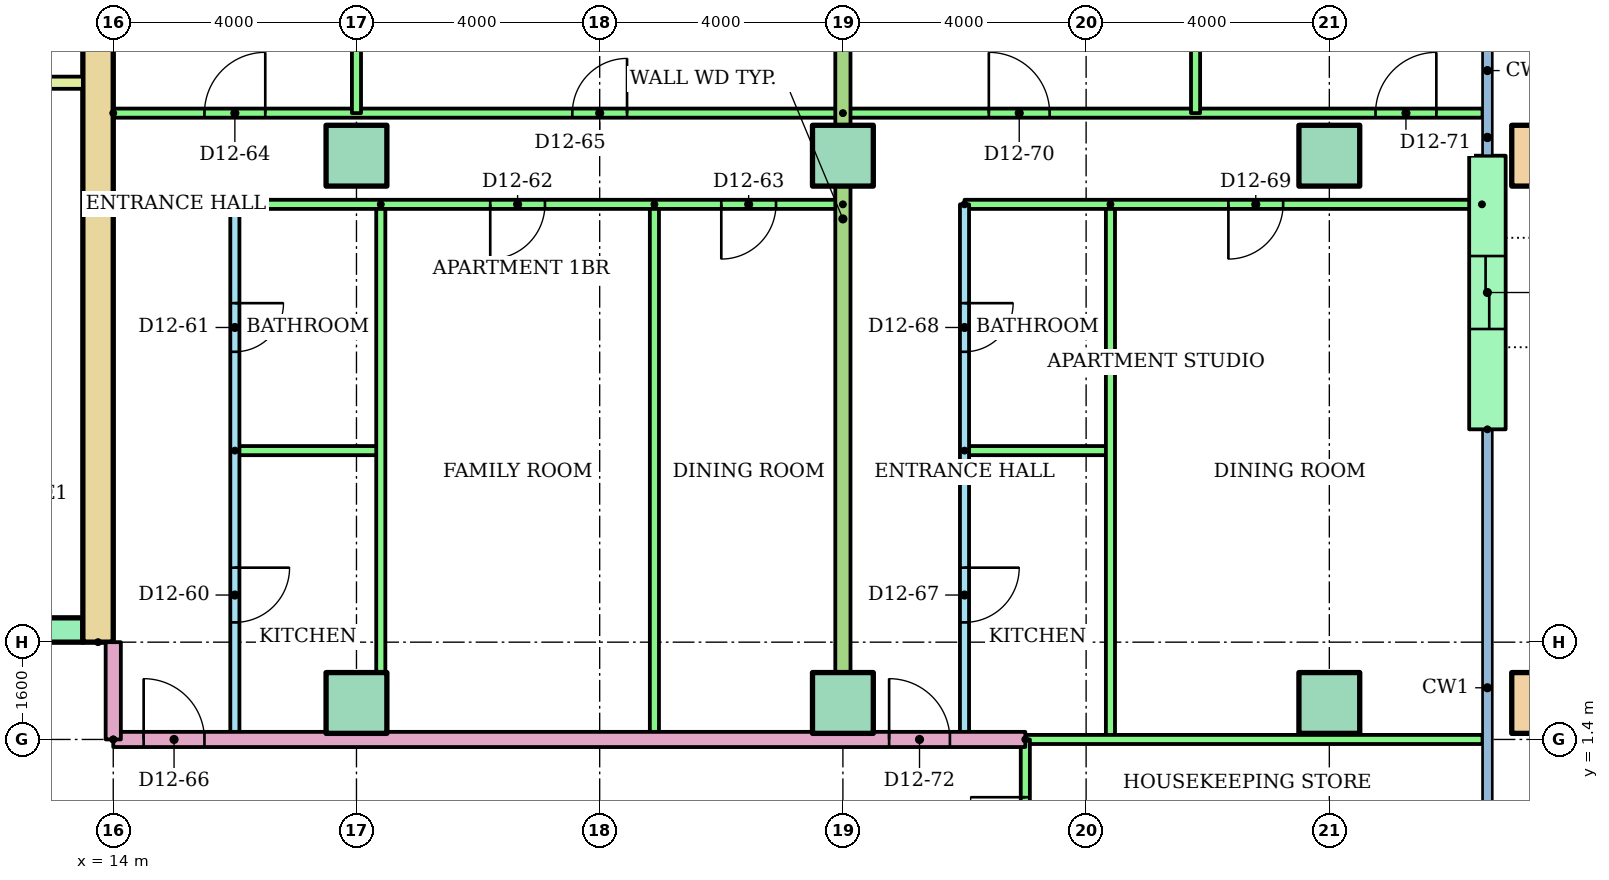
"""IFC4 building model, lengths in metres.
Left out: names, types, materials, properties, quantities, classifications, styles, units other than length and angle.
Written with IfcOpenShell. Run it as: python <this file> out.ifc"""

import sys

from ifc_helpers import new_model, si_unit, direction, frame, frame_2d, origin, origin_2d, place, context, subcontext, project, spatial, rectangle, hollow_rectangle, extrude, element, fill, save


model = new_model("IFC4")
c1 = context("Model", 3, precision=1e-05, world=origin(), true_north=direction((0.0, 1.0)))
c2 = subcontext(c1, "Body", "Model", "MODEL_VIEW")
j1 = project(units=[si_unit("LENGTHUNIT", "METRE"), si_unit("PLANEANGLEUNIT", "RADIAN")], contexts=[c1])
p1 = place(None, origin())
s1 = spatial("IfcSite", under=j1, at=p1, CompositionType="ELEMENT")
p2 = place(p1, origin())
s2 = spatial("IfcBuilding", under=s1, at=p2, CompositionType="ELEMENT")
p3 = place(p2, frame((0.0, 0.0, 48.0)))
s3 = spatial("IfcBuildingStorey", under=s2, at=p3, CompositionType="ELEMENT", Elevation=48.0)
for number, where in (
    (1, (18.0, 2.0, 0.0)),
    (2, (26.0, 2.0, 0.0)),
    (3, (34.0, 2.0, 0.0)),
):
    element("IfcColumn", number, at=place(p3, frame(where)), inside=s3, PredefinedType="COLUMN", context=c2, shape_type="SweptSolid", body=[
        extrude(rectangle(XDim=1.0, YDim=1.0, at=origin_2d()), origin(), (0.0, 0.0, 1.0), 3.2),
    ])
p4 = place(p3, frame((37.5, 2.0, 0.0)))
e4 = element("IfcColumn", 4, at=p4, inside=s3, PredefinedType="COLUMN", context=c2, shape_type="SweptSolid", body=[
    extrude(hollow_rectangle(XDim=1.0, YDim=1.0, WallThickness=0.05, at=origin_2d()), origin(), (0.0, 0.0, 1.0), 3.2),
])
for number, where in (
    (5, (18.0, 11.0, 0.0)),
    (6, (26.0, 11.0, 0.0)),
    (7, (34.0, 11.0, 0.0)),
):
    element("IfcColumn", number, at=place(p3, frame(where)), inside=s3, PredefinedType="COLUMN", context=c2, shape_type="SweptSolid", body=[
        extrude(rectangle(XDim=1.0, YDim=1.0, at=origin_2d()), origin(), (0.0, 0.0, 1.0), 3.2),
    ])
p5 = place(p3, frame((37.5, 11.0, 0.0)))
e8 = element("IfcColumn", 8, at=p5, inside=s3, PredefinedType="COLUMN", context=c2, shape_type="SweptSolid", body=[
    extrude(hollow_rectangle(XDim=1.0, YDim=1.0, WallThickness=0.05, at=origin_2d()), origin(), (0.0, 0.0, 1.0), 3.2),
])
p6 = place(p3, frame((36.6, 6.5, 0.0), z_axis=(0.0, 0.0, 1.0), x_axis=(0.0, 1.0, 0.0)))
e9 = element("IfcWall", 9, at=p6, inside=s3, PredefinedType="STANDARD", context=c2, shape_type="SweptSolid", body=[
    extrude(rectangle(XDim=4.5, YDim=0.6, at=frame_2d((2.25, 0.0))), origin(), (0.0, 0.0, 1.0), 2.92),
])
p7 = place(p6, frame((1.65, 0.0, 0.0)))
e10 = element("IfcOpeningElement", 10, at=p7, cuts=e9, PredefinedType="OPENING", context=c2, shape_type="SweptSolid", body=[
    extrude(rectangle(XDim=1.2, YDim=2.1, at=frame_2d((0.6, 1.05))), frame((0.0, 0.31, 0.0), z_axis=(0.0, -1.0, 0.0), x_axis=(1.0, 0.0, 0.0)), (0.0, 0.0, 1.0), 0.62),
])
p8 = place(p3, frame((13.75, 3.0, 0.0), z_axis=(0.0, 0.0, 1.0), x_axis=(0.0, 1.0, 0.0)))
e11 = element("IfcWall", 11, at=p8, inside=s3, PredefinedType="SHEAR", context=c2, shape_type="SweptSolid", body=[
    extrude(rectangle(XDim=17.0, YDim=0.5, at=frame_2d((8.5, 0.0))), origin(), (0.0, 0.0, 1.0), 2.92),
])
p9 = place(p3, frame((-13.5, 3.2, 0.0)))
e12 = element("IfcWall", 12, at=p9, inside=s3, PredefinedType="SHEAR", context=c2, shape_type="SweptSolid", body=[
    extrude(rectangle(XDim=27.0, YDim=0.4, at=frame_2d((13.5, 0.0))), origin(), (0.0, 0.0, 1.0), 2.92),
])
p10 = place(p9, frame((6.861, 0.0, 0.0)))
e13 = element("IfcOpeningElement", 13, at=p10, cuts=e12, PredefinedType="OPENING", context=c2, shape_type="SweptSolid", body=[
    extrude(rectangle(XDim=1.1, YDim=2.1, at=frame_2d((0.55, 1.05))), frame((0.0, 0.21, 0.0), z_axis=(0.0, -1.0, 0.0), x_axis=(1.0, 0.0, 0.0)), (0.0, 0.0, 1.0), 0.42),
])
p11 = place(p9, frame((9.906, 0.0, 0.0)))
e14 = element("IfcOpeningElement", 14, at=p11, cuts=e12, PredefinedType="OPENING", context=c2, shape_type="SweptSolid", body=[
    extrude(rectangle(XDim=1.1, YDim=2.1, at=frame_2d((0.55, 1.05))), frame((0.0, 0.21, 0.0), z_axis=(0.0, -1.0, 0.0), x_axis=(1.0, 0.0, 0.0)), (0.0, 0.0, 1.0), 0.42),
])
p12 = place(p9, frame((15.994, 0.0, 0.0)))
e15 = element("IfcOpeningElement", 15, at=p12, cuts=e12, PredefinedType="OPENING", context=c2, shape_type="SweptSolid", body=[
    extrude(rectangle(XDim=1.1, YDim=2.1, at=frame_2d((0.55, 1.05))), frame((0.0, 0.21, 0.0), z_axis=(0.0, -1.0, 0.0), x_axis=(1.0, 0.0, 0.0)), (0.0, 0.0, 1.0), 0.42),
])
p13 = place(p9, frame((19.039, 0.0, 0.0)))
e16 = element("IfcOpeningElement", 16, at=p13, cuts=e12, PredefinedType="OPENING", context=c2, shape_type="SweptSolid", body=[
    extrude(rectangle(XDim=1.1, YDim=2.1, at=frame_2d((0.55, 1.05))), frame((0.0, 0.21, 0.0), z_axis=(0.0, -1.0, 0.0), x_axis=(1.0, 0.0, 0.0)), (0.0, 0.0, 1.0), 0.42),
])
p14 = place(p9, frame((12.6, 0.0, 0.0)))
e17 = element("IfcOpeningElement", 17, at=p14, cuts=e12, PredefinedType="OPENING", context=c2, shape_type="SweptSolid", body=[
    extrude(rectangle(XDim=1.8, YDim=2.1, at=frame_2d((0.9, 1.05))), frame((0.0, 0.21, 0.0), z_axis=(0.0, -1.0, 0.0), x_axis=(1.0, 0.0, 0.0)), (0.0, 0.0, 1.0), 0.42),
])
p15 = place(p3, frame((9.6, 12.2, 0.0)))
e18 = element("IfcWall", 18, at=p15, inside=s3, PredefinedType="PARTITIONING", context=c2, shape_type="SweptSolid", body=[
    extrude(rectangle(XDim=3.9, YDim=0.2, at=frame_2d((1.95, 0.0))), origin(), (0.0, 0.0, 1.0), 2.92),
])
p16 = place(p3, frame((16.0, 10.2, 0.0), z_axis=(0.0, 0.0, 1.0), x_axis=(0.0, -1.0, 0.0)))
e19 = element("IfcWall", 19, at=p16, inside=s3, PredefinedType="PARTITIONING", context=c2, shape_type="SweptSolid", body=[
    extrude(rectangle(XDim=8.8, YDim=0.15, at=frame_2d((4.4, 0.0))), origin(), (0.0, 0.0, 1.0), 2.4),
])
p17 = place(p16, frame((5.975, 0.0, 0.0)))
e20 = element("IfcOpeningElement", 20, at=p17, cuts=e19, PredefinedType="OPENING", context=c2, shape_type="SweptSolid", body=[
    extrude(rectangle(XDim=0.9, YDim=2.1, at=frame_2d((0.45, 1.05))), frame((0.0, 0.085, 0.0), z_axis=(0.0, -1.0, 0.0), x_axis=(1.0, 0.0, 0.0)), (0.0, 0.0, 1.0), 0.17),
])
p18 = place(p16, frame((1.625, 0.0, 0.0)))
e21 = element("IfcOpeningElement", 21, at=p18, cuts=e19, PredefinedType="OPENING", context=c2, shape_type="SweptSolid", body=[
    extrude(rectangle(XDim=0.8, YDim=2.1, at=frame_2d((0.4, 1.05))), frame((0.0, 0.085, 0.0), z_axis=(0.0, -1.0, 0.0), x_axis=(1.0, 0.0, 0.0)), (0.0, 0.0, 1.0), 0.17),
])
p19 = place(p3, frame((16.0, 6.15, 0.0)))
e22 = element("IfcWall", 22, at=p19, inside=s3, PredefinedType="PARTITIONING", context=c2, shape_type="SweptSolid", body=[
    extrude(rectangle(XDim=2.4, YDim=0.15, at=frame_2d((1.2, 0.0))), origin(), (0.0, 0.0, 1.0), 2.4),
])
for number, where, z_axis, x_axis in (
    (23, (18.4, 10.2, 0.0), (0.0, 0.0, 1.0), (0.0, -1.0, 0.0)),
    (24, (22.9, 10.2, 0.0), (0.0, 0.0, 1.0), (0.0, -1.0, 0.0)),
):
    element("IfcWall", number, at=place(p3, frame(where, z_axis=z_axis, x_axis=x_axis)), inside=s3, PredefinedType="PARTITIONING", context=c2, shape_type="SweptSolid", body=[
        extrude(rectangle(XDim=8.8, YDim=0.15, at=frame_2d((4.4, 0.0))), origin(), (0.0, 0.0, 1.0), 2.4),
    ])
p20 = place(p3, frame((26.0, 10.2, 0.0), z_axis=(0.0, 0.0, 1.0), x_axis=(-1.0, 0.0, 0.0)))
e25 = element("IfcWall", 25, at=p20, inside=s3, PredefinedType="PARTITIONING", context=c2, shape_type="SweptSolid", body=[
    extrude(rectangle(XDim=10.0, YDim=0.15, at=frame_2d((5.0, 0.0))), origin(), (0.0, 0.0, 1.0), 2.4),
])
p21 = place(p20, frame((4.9, 0.0, 0.0)))
e26 = element("IfcOpeningElement", 26, at=p21, cuts=e25, PredefinedType="OPENING", context=c2, shape_type="SweptSolid", body=[
    extrude(rectangle(XDim=0.9, YDim=2.1, at=frame_2d((0.45, 1.05))), frame((0.0, 0.085, 0.0), z_axis=(0.0, -1.0, 0.0), x_axis=(1.0, 0.0, 0.0)), (0.0, 0.0, 1.0), 0.17),
])
p22 = place(p20, frame((1.1, 0.0, 0.0)))
e27 = element("IfcOpeningElement", 27, at=p22, cuts=e25, PredefinedType="OPENING", context=c2, shape_type="SweptSolid", body=[
    extrude(rectangle(XDim=0.9, YDim=2.1, at=frame_2d((0.45, 1.05))), frame((0.0, 0.085, 0.0), z_axis=(0.0, -1.0, 0.0), x_axis=(1.0, 0.0, 0.0)), (0.0, 0.0, 1.0), 0.17),
])
p23 = place(p3, frame((14.0, 11.7, 0.0)))
e28 = element("IfcWall", 28, at=p23, inside=s3, PredefinedType="PARTITIONING", context=c2, shape_type="SweptSolid", body=[
    extrude(rectangle(XDim=12.0, YDim=0.15, at=frame_2d((6.0, 0.0))), origin(), (0.0, 0.0, 1.0), 2.4),
])
p24 = place(p23, frame((1.5, 0.0, 0.0)))
e29 = element("IfcOpeningElement", 29, at=p24, cuts=e28, PredefinedType="OPENING", context=c2, shape_type="SweptSolid", body=[
    extrude(rectangle(XDim=1.0, YDim=2.1, at=frame_2d((0.5, 1.05))), frame((0.0, 0.085, 0.0), z_axis=(0.0, -1.0, 0.0), x_axis=(1.0, 0.0, 0.0)), (0.0, 0.0, 1.0), 0.17),
])
p25 = place(p23, frame((7.55, 0.0, 0.0)))
e30 = element("IfcOpeningElement", 30, at=p25, cuts=e28, PredefinedType="OPENING", context=c2, shape_type="SweptSolid", body=[
    extrude(rectangle(XDim=0.9, YDim=2.1, at=frame_2d((0.45, 1.05))), frame((0.0, 0.085, 0.0), z_axis=(0.0, -1.0, 0.0), x_axis=(1.0, 0.0, 0.0)), (0.0, 0.0, 1.0), 0.17),
])
p26 = place(p3, frame((18.0, 18.521, 0.0), z_axis=(0.0, 0.0, 1.0), x_axis=(0.0, -1.0, 0.0)))
e31 = element("IfcWall", 31, at=p26, inside=s3, PredefinedType="PARTITIONING", context=c2, shape_type="SweptSolid", body=[
    extrude(rectangle(XDim=6.821, YDim=0.15, at=frame_2d((3.411, 0.0))), origin(), (0.0, 0.0, 1.0), 2.4),
])
p27 = place(p3, frame((28.0, 10.2, 0.0), z_axis=(0.0, 0.0, 1.0), x_axis=(0.0, -1.0, 0.0)))
e32 = element("IfcWall", 32, at=p27, inside=s3, PredefinedType="PARTITIONING", context=c2, shape_type="SweptSolid", body=[
    extrude(rectangle(XDim=8.8, YDim=0.15, at=frame_2d((4.4, 0.0))), origin(), (0.0, 0.0, 1.0), 2.4),
])
p28 = place(p27, frame((5.975, 0.0, 0.0)))
e33 = element("IfcOpeningElement", 33, at=p28, cuts=e32, PredefinedType="OPENING", context=c2, shape_type="SweptSolid", body=[
    extrude(rectangle(XDim=0.9, YDim=2.1, at=frame_2d((0.45, 1.05))), frame((0.0, 0.085, 0.0), z_axis=(0.0, -1.0, 0.0), x_axis=(1.0, 0.0, 0.0)), (0.0, 0.0, 1.0), 0.17),
])
p29 = place(p27, frame((1.625, 0.0, 0.0)))
e34 = element("IfcOpeningElement", 34, at=p29, cuts=e32, PredefinedType="OPENING", context=c2, shape_type="SweptSolid", body=[
    extrude(rectangle(XDim=0.8, YDim=2.1, at=frame_2d((0.4, 1.05))), frame((0.0, 0.085, 0.0), z_axis=(0.0, -1.0, 0.0), x_axis=(1.0, 0.0, 0.0)), (0.0, 0.0, 1.0), 0.17),
])
p30 = place(p3, frame((28.0, 6.15, 0.0)))
e35 = element("IfcWall", 35, at=p30, inside=s3, PredefinedType="PARTITIONING", context=c2, shape_type="SweptSolid", body=[
    extrude(rectangle(XDim=2.4, YDim=0.15, at=frame_2d((1.2, 0.0))), origin(), (0.0, 0.0, 1.0), 2.4),
])
p31 = place(p3, frame((30.4, 10.2, 0.0), z_axis=(0.0, 0.0, 1.0), x_axis=(0.0, -1.0, 0.0)))
e36 = element("IfcWall", 36, at=p31, inside=s3, PredefinedType="PARTITIONING", context=c2, shape_type="SweptSolid", body=[
    extrude(rectangle(XDim=8.8, YDim=0.15, at=frame_2d((4.4, 0.0))), origin(), (0.0, 0.0, 1.0), 2.4),
])
p32 = place(p3, frame((36.51, 10.2, 0.0), z_axis=(0.0, 0.0, 1.0), x_axis=(-1.0, 0.0, 0.0)))
e37 = element("IfcWall", 37, at=p32, inside=s3, PredefinedType="PARTITIONING", context=c2, shape_type="SweptSolid", body=[
    extrude(rectangle(XDim=8.51, YDim=0.15, at=frame_2d((4.255, 0.0))), origin(), (0.0, 0.0, 1.0), 2.4),
])
p33 = place(p32, frame((3.27, 0.0, 0.0)))
e38 = element("IfcOpeningElement", 38, at=p33, cuts=e37, PredefinedType="OPENING", context=c2, shape_type="SweptSolid", body=[
    extrude(rectangle(XDim=0.9, YDim=2.1, at=frame_2d((0.45, 1.05))), frame((0.0, 0.085, 0.0), z_axis=(0.0, -1.0, 0.0), x_axis=(1.0, 0.0, 0.0)), (0.0, 0.0, 1.0), 0.17),
])
p34 = place(p3, frame((26.0, 11.7, 0.0)))
e39 = element("IfcWall", 39, at=p34, inside=s3, PredefinedType="PARTITIONING", context=c2, shape_type="SweptSolid", body=[
    extrude(rectangle(XDim=10.52, YDim=0.15, at=frame_2d((5.26, 0.0))), origin(), (0.0, 0.0, 1.0), 2.4),
])
p35 = place(p34, frame((2.4, 0.0, 0.0)))
e40 = element("IfcOpeningElement", 40, at=p35, cuts=e39, PredefinedType="OPENING", context=c2, shape_type="SweptSolid", body=[
    extrude(rectangle(XDim=1.0, YDim=2.1, at=frame_2d((0.5, 1.05))), frame((0.0, 0.085, 0.0), z_axis=(0.0, -1.0, 0.0), x_axis=(1.0, 0.0, 0.0)), (0.0, 0.0, 1.0), 0.17),
])
p36 = place(p34, frame((8.76, 0.0, 0.0)))
e41 = element("IfcOpeningElement", 41, at=p36, cuts=e39, PredefinedType="OPENING", context=c2, shape_type="SweptSolid", body=[
    extrude(rectangle(XDim=1.0, YDim=2.1, at=frame_2d((0.5, 1.05))), frame((0.0, 0.085, 0.0), z_axis=(0.0, -1.0, 0.0), x_axis=(1.0, 0.0, 0.0)), (0.0, 0.0, 1.0), 0.17),
])
p37 = place(p3, frame((31.8, 16.72, 0.0), z_axis=(0.0, 0.0, 1.0), x_axis=(0.0, -1.0, 0.0)))
e42 = element("IfcWall", 42, at=p37, inside=s3, PredefinedType="PARTITIONING", context=c2, shape_type="SweptSolid", body=[
    extrude(rectangle(XDim=5.02, YDim=0.15, at=frame_2d((2.51, 0.0))), origin(), (0.0, 0.0, 1.0), 2.4),
])
p38 = place(p3, frame((26.0, 18.521, 0.0), z_axis=(0.0, 0.0, 1.0), x_axis=(0.0, -1.0, 0.0)))
e43 = element("IfcWall", 43, at=p38, inside=s3, PredefinedType="PARTITIONING", context=c2, shape_type="SweptSolid", body=[
    extrude(rectangle(XDim=17.121, YDim=0.25, at=frame_2d((8.561, 0.0))), origin(), (0.0, 0.0, 1.0), 2.4),
])
p39 = place(p3, frame((14.0, 1.4, 0.0)))
e44 = element("IfcWall", 44, at=p39, inside=s3, PredefinedType="PARTITIONING", context=c2, shape_type="SweptSolid", body=[
    extrude(rectangle(XDim=15.0, YDim=0.25, at=frame_2d((7.5, 0.0))), origin(), (0.0, 0.0, 1.0), 2.4),
])
p40 = place(p39, frame((0.5, 0.0, 0.0)))
e45 = element("IfcOpeningElement", 45, at=p40, cuts=e44, PredefinedType="OPENING", context=c2, shape_type="SweptSolid", body=[
    extrude(rectangle(XDim=1.0, YDim=2.1, at=frame_2d((0.5, 1.05))), frame((0.0, 0.135, 0.0), z_axis=(0.0, -1.0, 0.0), x_axis=(1.0, 0.0, 0.0)), (0.0, 0.0, 1.0), 0.27),
])
p41 = place(p39, frame((12.76, 0.0, 0.0)))
e46 = element("IfcOpeningElement", 46, at=p41, cuts=e44, PredefinedType="OPENING", context=c2, shape_type="SweptSolid", body=[
    extrude(rectangle(XDim=1.0, YDim=2.1, at=frame_2d((0.5, 1.05))), frame((0.0, 0.135, 0.0), z_axis=(0.0, -1.0, 0.0), x_axis=(1.0, 0.0, 0.0)), (0.0, 0.0, 1.0), 0.27),
])
p42 = place(p3, frame((29.0, 1.4, 0.0)))
e47 = element("IfcWall", 47, at=p42, inside=s3, PredefinedType="PARTITIONING", context=c2, shape_type="SweptSolid", body=[
    extrude(rectangle(XDim=7.52, YDim=0.15, at=frame_2d((3.76, 0.0))), origin(), (0.0, 0.0, 1.0), 2.4),
])
p43 = place(p3, frame((29.0, -1.4, 0.0), z_axis=(0.0, 0.0, 1.0), x_axis=(0.0, 1.0, 0.0)))
e48 = element("IfcWall", 48, at=p43, inside=s3, PredefinedType="PARTITIONING", context=c2, shape_type="SweptSolid", body=[
    extrude(rectangle(XDim=2.8, YDim=0.15, at=frame_2d((1.4, 0.0))), origin(), (0.0, 0.0, 1.0), 2.4),
])
p44 = place(p43, frame((0.95, 0.0, 0.0)))
e49 = element("IfcOpeningElement", 49, at=p44, cuts=e48, PredefinedType="OPENING", context=c2, shape_type="SweptSolid", body=[
    extrude(rectangle(XDim=0.9, YDim=2.1, at=frame_2d((0.45, 1.05))), frame((0.0, 0.085, 0.0), z_axis=(0.0, -1.0, 0.0), x_axis=(1.0, 0.0, 0.0)), (0.0, 0.0, 1.0), 0.17),
])
p45 = place(p3, frame((14.0, 1.4, 0.0), z_axis=(0.0, 0.0, 1.0), x_axis=(0.0, 1.0, 0.0)))
e50 = element("IfcWall", 50, at=p45, inside=s3, PredefinedType="PARTITIONING", context=c2, shape_type="SweptSolid", body=[
    extrude(rectangle(XDim=1.6, YDim=0.25, at=frame_2d((0.8, 0.0))), origin(), (0.0, 0.0, 1.0), 2.4),
])
p46 = place(p17, origin())
e51 = element("IfcDoor", 51, at=p46, inside=s3, OperationType="SINGLE_SWING_LEFT", PredefinedType="DOOR", context=c2, shape_type="SweptSolid", body=[
    extrude(rectangle(XDim=0.9, YDim=2.1, at=frame_2d((0.45, 1.05))), frame((0.0, 0.025, 0.0), z_axis=(0.0, -1.0, 0.0), x_axis=(1.0, 0.0, 0.0)), (0.0, 0.0, 1.0), 0.05),
])
fill(e20, e51)
p47 = place(p18, origin())
e52 = element("IfcDoor", 52, at=p47, inside=s3, OperationType="SINGLE_SWING_LEFT", PredefinedType="DOOR", context=c2, shape_type="SweptSolid", body=[
    extrude(rectangle(XDim=0.8, YDim=2.1, at=frame_2d((0.4, 1.05))), frame((0.0, 0.025, 0.0), z_axis=(0.0, -1.0, 0.0), x_axis=(1.0, 0.0, 0.0)), (0.0, 0.0, 1.0), 0.05),
])
fill(e21, e52)
p48 = place(p21, origin())
e53 = element("IfcDoor", 53, at=p48, inside=s3, OperationType="SINGLE_SWING_RIGHT", PredefinedType="DOOR", context=c2, shape_type="SweptSolid", body=[
    extrude(rectangle(XDim=0.9, YDim=2.1, at=frame_2d((0.45, 1.05))), frame((0.0, 0.025, 0.0), z_axis=(0.0, -1.0, 0.0), x_axis=(1.0, 0.0, 0.0)), (0.0, 0.0, 1.0), 0.05),
])
fill(e26, e53)
p49 = place(p22, origin())
e54 = element("IfcDoor", 54, at=p49, inside=s3, OperationType="SINGLE_SWING_RIGHT", PredefinedType="DOOR", context=c2, shape_type="SweptSolid", body=[
    extrude(rectangle(XDim=0.9, YDim=2.1, at=frame_2d((0.45, 1.05))), frame((0.0, 0.025, 0.0), z_axis=(0.0, -1.0, 0.0), x_axis=(1.0, 0.0, 0.0)), (0.0, 0.0, 1.0), 0.05),
])
fill(e27, e54)
p50 = place(p24, origin())
e55 = element("IfcDoor", 55, at=p50, inside=s3, OperationType="SINGLE_SWING_RIGHT", PredefinedType="DOOR", context=c2, shape_type="SweptSolid", body=[
    extrude(rectangle(XDim=1.0, YDim=2.1, at=frame_2d((0.5, 1.05))), frame((0.0, 0.025, 0.0), z_axis=(0.0, -1.0, 0.0), x_axis=(1.0, 0.0, 0.0)), (0.0, 0.0, 1.0), 0.05),
])
fill(e29, e55)
p51 = place(p25, origin())
e56 = element("IfcDoor", 56, at=p51, inside=s3, OperationType="SINGLE_SWING_RIGHT", PredefinedType="DOOR", context=c2, shape_type="SweptSolid", body=[
    extrude(rectangle(XDim=0.9, YDim=2.1, at=frame_2d((0.45, 1.05))), frame((0.0, 0.025, 0.0), z_axis=(0.0, -1.0, 0.0), x_axis=(1.0, 0.0, 0.0)), (0.0, 0.0, 1.0), 0.05),
])
fill(e30, e56)
p52 = place(p40, origin())
e57 = element("IfcDoor", 57, at=p52, inside=s3, OperationType="SINGLE_SWING_LEFT", PredefinedType="DOOR", context=c2, shape_type="SweptSolid", body=[
    extrude(rectangle(XDim=1.0, YDim=2.1, at=frame_2d((0.5, 1.05))), frame((0.0, 0.025, 0.0), z_axis=(0.0, -1.0, 0.0), x_axis=(1.0, 0.0, 0.0)), (0.0, 0.0, 1.0), 0.05),
])
fill(e45, e57)
p53 = place(p28, origin())
e58 = element("IfcDoor", 58, at=p53, inside=s3, OperationType="SINGLE_SWING_LEFT", PredefinedType="DOOR", context=c2, shape_type="SweptSolid", body=[
    extrude(rectangle(XDim=0.9, YDim=2.1, at=frame_2d((0.45, 1.05))), frame((0.0, 0.025, 0.0), z_axis=(0.0, -1.0, 0.0), x_axis=(1.0, 0.0, 0.0)), (0.0, 0.0, 1.0), 0.05),
])
fill(e33, e58)
p54 = place(p29, origin())
e59 = element("IfcDoor", 59, at=p54, inside=s3, OperationType="SINGLE_SWING_LEFT", PredefinedType="DOOR", context=c2, shape_type="SweptSolid", body=[
    extrude(rectangle(XDim=0.8, YDim=2.1, at=frame_2d((0.4, 1.05))), frame((0.0, 0.025, 0.0), z_axis=(0.0, -1.0, 0.0), x_axis=(1.0, 0.0, 0.0)), (0.0, 0.0, 1.0), 0.05),
])
fill(e34, e59)
p55 = place(p33, origin())
e60 = element("IfcDoor", 60, at=p55, inside=s3, OperationType="SINGLE_SWING_RIGHT", PredefinedType="DOOR", context=c2, shape_type="SweptSolid", body=[
    extrude(rectangle(XDim=0.9, YDim=2.1, at=frame_2d((0.45, 1.05))), frame((0.0, 0.025, 0.0), z_axis=(0.0, -1.0, 0.0), x_axis=(1.0, 0.0, 0.0)), (0.0, 0.0, 1.0), 0.05),
])
fill(e38, e60)
p56 = place(p35, origin())
e61 = element("IfcDoor", 61, at=p56, inside=s3, OperationType="SINGLE_SWING_LEFT", PredefinedType="DOOR", context=c2, shape_type="SweptSolid", body=[
    extrude(rectangle(XDim=1.0, YDim=2.1, at=frame_2d((0.5, 1.05))), frame((0.0, 0.025, 0.0), z_axis=(0.0, -1.0, 0.0), x_axis=(1.0, 0.0, 0.0)), (0.0, 0.0, 1.0), 0.05),
])
fill(e40, e61)
p57 = place(p36, origin())
e62 = element("IfcDoor", 62, at=p57, inside=s3, OperationType="SINGLE_SWING_RIGHT", PredefinedType="DOOR", context=c2, shape_type="SweptSolid", body=[
    extrude(rectangle(XDim=1.0, YDim=2.1, at=frame_2d((0.5, 1.05))), frame((0.0, 0.025, 0.0), z_axis=(0.0, -1.0, 0.0), x_axis=(1.0, 0.0, 0.0)), (0.0, 0.0, 1.0), 0.05),
])
fill(e41, e62)
p58 = place(p41, origin())
e63 = element("IfcDoor", 63, at=p58, inside=s3, OperationType="SINGLE_SWING_LEFT", PredefinedType="DOOR", context=c2, shape_type="SweptSolid", body=[
    extrude(rectangle(XDim=1.0, YDim=2.1, at=frame_2d((0.5, 1.05))), frame((0.0, 0.025, 0.0), z_axis=(0.0, -1.0, 0.0), x_axis=(1.0, 0.0, 0.0)), (0.0, 0.0, 1.0), 0.05),
])
fill(e46, e63)
p59 = place(p44, origin())
e64 = element("IfcDoor", 64, at=p59, inside=s3, OperationType="SINGLE_SWING_RIGHT", PredefinedType="DOOR", context=c2, shape_type="SweptSolid", body=[
    extrude(rectangle(XDim=0.9, YDim=2.1, at=frame_2d((0.45, 1.05))), frame((0.0, 0.025, 0.0), z_axis=(0.0, -1.0, 0.0), x_axis=(1.0, 0.0, 0.0)), (0.0, 0.0, 1.0), 0.05),
])
fill(e49, e64)
p60 = place(p7, origin())
e65 = element("IfcDoor", 65, at=p60, inside=s3, OperationType="SLIDING_TO_LEFT", PredefinedType="DOOR", context=c2, shape_type="SweptSolid", body=[
    extrude(rectangle(XDim=1.2, YDim=2.1, at=frame_2d((0.6, 1.05))), frame((0.0, 0.025, 0.0), z_axis=(0.0, -1.0, 0.0), x_axis=(1.0, 0.0, 0.0)), (0.0, 0.0, 1.0), 0.05),
])
fill(e10, e65)
save(model, sys.argv[1])
